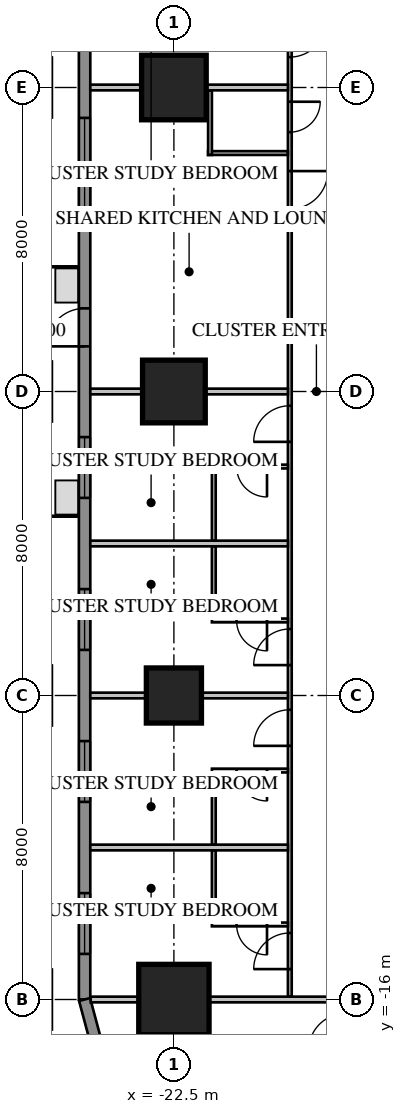
"""IFC4 building model, lengths in metres.
Left out: names, types, materials, properties, quantities, classifications, styles, units other than length and angle.
Written with IfcOpenShell. Run it as: python <this file> out.ifc"""

import sys

from ifc_helpers import new_model, si_unit, direction, frame, frame_2d, origin, origin_2d, place, context, subcontext, project, spatial, rectangle, extrude, element, fill, save


model = new_model("IFC4")
c1 = context("Model", 3, precision=1e-05, world=origin(), true_north=direction((0.0, 1.0)))
c2 = subcontext(c1, "Body", "Model", "MODEL_VIEW")
j1 = project(units=[si_unit("LENGTHUNIT", "METRE"), si_unit("PLANEANGLEUNIT", "RADIAN")], contexts=[c1])
p1 = place(None, origin())
s1 = spatial("IfcSite", under=j1, at=p1, CompositionType="ELEMENT")
p2 = place(p1, origin())
s2 = spatial("IfcBuilding", under=s1, at=p2, CompositionType="ELEMENT")
p3 = place(p2, frame((0.0, 0.0, 39.1)))
s3 = spatial("IfcBuildingStorey", under=s2, at=p3, CompositionType="ELEMENT", Elevation=39.1)
p4 = place(p3, frame((-22.5, 8.0, 0.0), z_axis=(0.0, 0.0, 1.0), x_axis=(1.0, 0.0, 0.0)))
e1 = element("IfcColumn", 1, at=p4, inside=s3, PredefinedType="COLUMN", context=c2, shape_type="SweptSolid", body=[
    extrude(rectangle(XDim=1.7, YDim=1.7, at=origin_2d()), origin(), (0.0, 0.0, 1.0), 3.85),
])
p5 = place(p3, frame((-22.5, 0.0, 0.0), z_axis=(0.0, 0.0, 1.0), x_axis=(1.0, 0.0, 0.0)))
e2 = element("IfcColumn", 2, at=p5, inside=s3, PredefinedType="COLUMN", context=c2, shape_type="SweptSolid", body=[
    extrude(rectangle(XDim=1.65, YDim=1.65, at=origin_2d()), origin(), (0.0, 0.0, 1.0), 3.85),
])
p6 = place(p3, frame((-22.5, -8.0, 0.0), z_axis=(0.0, 0.0, 1.0), x_axis=(1.0, 0.0, 0.0)))
e3 = element("IfcColumn", 3, at=p6, inside=s3, PredefinedType="COLUMN", context=c2, shape_type="SweptSolid", body=[
    extrude(rectangle(XDim=1.45, YDim=1.45, at=origin_2d()), origin(), (0.0, 0.0, 1.0), 3.85),
])
p7 = place(p3, frame((-22.5, -16.0, 0.0), z_axis=(0.0, 0.0, 1.0), x_axis=(1.0, 0.0, 0.0)))
e4 = element("IfcColumn", 4, at=p7, inside=s3, PredefinedType="COLUMN", context=c2, shape_type="SweptSolid", body=[
    extrude(rectangle(XDim=1.85, YDim=1.85, at=origin_2d()), origin(), (0.0, 0.0, 1.0), 3.85),
])
p8 = place(p3, frame((-24.85, 16.0, 0.0), z_axis=(0.0, 0.0, 1.0), x_axis=(0.0, -1.0, 0.0)))
e5 = element("IfcWall", 5, at=p8, inside=s3, PredefinedType="SOLIDWALL", context=c2, shape_type="SweptSolid", body=[
    extrude(rectangle(XDim=32.0, YDim=0.3, at=frame_2d((16.0, 0.0))), origin(), (0.0, 0.0, 1.0), 3.65),
])
p9 = place(p8, frame((1.2, 0.0, 0.75)))
e6 = element("IfcOpeningElement", 6, at=p9, cuts=e5, PredefinedType="OPENING", context=c2, shape_type="SweptSolid", body=[
    extrude(rectangle(XDim=1.6, YDim=1.8, at=frame_2d((0.8, 0.9))), frame((0.0, 0.17, 0.0), z_axis=(0.0, -1.0, 0.0), x_axis=(1.0, 0.0, 0.0)), (0.0, 0.0, 1.0), 0.34),
])
p10 = place(p8, frame((5.2, 0.0, 0.75)))
e7 = element("IfcOpeningElement", 7, at=p10, cuts=e5, PredefinedType="OPENING", context=c2, shape_type="SweptSolid", body=[
    extrude(rectangle(XDim=1.6, YDim=1.8, at=frame_2d((0.8, 0.9))), frame((0.0, 0.17, 0.0), z_axis=(0.0, -1.0, 0.0), x_axis=(1.0, 0.0, 0.0)), (0.0, 0.0, 1.0), 0.34),
])
p11 = place(p8, frame((17.2, 0.0, 0.75)))
e8 = element("IfcOpeningElement", 8, at=p11, cuts=e5, PredefinedType="OPENING", context=c2, shape_type="SweptSolid", body=[
    extrude(rectangle(XDim=1.6, YDim=1.8, at=frame_2d((0.8, 0.9))), frame((0.0, 0.17, 0.0), z_axis=(0.0, -1.0, 0.0), x_axis=(1.0, 0.0, 0.0)), (0.0, 0.0, 1.0), 0.34),
])
p12 = place(p8, frame((21.2, 0.0, 0.75)))
e9 = element("IfcOpeningElement", 9, at=p12, cuts=e5, PredefinedType="OPENING", context=c2, shape_type="SweptSolid", body=[
    extrude(rectangle(XDim=1.6, YDim=1.8, at=frame_2d((0.8, 0.9))), frame((0.0, 0.17, 0.0), z_axis=(0.0, -1.0, 0.0), x_axis=(1.0, 0.0, 0.0)), (0.0, 0.0, 1.0), 0.34),
])
p13 = place(p8, frame((25.2, 0.0, 0.75)))
e10 = element("IfcOpeningElement", 10, at=p13, cuts=e5, PredefinedType="OPENING", context=c2, shape_type="SweptSolid", body=[
    extrude(rectangle(XDim=1.6, YDim=1.8, at=frame_2d((0.8, 0.9))), frame((0.0, 0.17, 0.0), z_axis=(0.0, -1.0, 0.0), x_axis=(1.0, 0.0, 0.0)), (0.0, 0.0, 1.0), 0.34),
])
p14 = place(p8, frame((29.2, 0.0, 0.75)))
e11 = element("IfcOpeningElement", 11, at=p14, cuts=e5, PredefinedType="OPENING", context=c2, shape_type="SweptSolid", body=[
    extrude(rectangle(XDim=1.6, YDim=1.8, at=frame_2d((0.8, 0.9))), frame((0.0, 0.17, 0.0), z_axis=(0.0, -1.0, 0.0), x_axis=(1.0, 0.0, 0.0)), (0.0, 0.0, 1.0), 0.34),
])
p15 = place(p8, frame((8.8, 0.0, 0.75)))
e12 = element("IfcOpeningElement", 12, at=p15, cuts=e5, PredefinedType="OPENING", context=c2, shape_type="SweptSolid", body=[
    extrude(rectangle(XDim=2.4, YDim=1.8, at=frame_2d((1.2, 0.9))), frame((0.0, 0.17, 0.0), z_axis=(0.0, -1.0, 0.0), x_axis=(1.0, 0.0, 0.0)), (0.0, 0.0, 1.0), 0.34),
])
p16 = place(p8, frame((13.812, 0.0, 0.0)))
e13 = element("IfcOpeningElement", 13, at=p16, cuts=e5, PredefinedType="OPENING", context=c2, shape_type="SweptSolid", body=[
    extrude(rectangle(XDim=1.0, YDim=2.4, at=frame_2d((0.5, 1.2))), frame((0.0, 0.17, 0.0), z_axis=(0.0, -1.0, 0.0), x_axis=(1.0, 0.0, 0.0)), (0.0, 0.0, 1.0), 0.34),
])
p17 = place(p3, frame((-24.85, -16.0, 0.0), z_axis=(0.0, 0.0, 1.0), x_axis=(0.258839972501, -0.965920218567, 0.0)))
e14 = element("IfcWall", 14, at=p17, inside=s3, PredefinedType="SOLIDWALL", context=c2, shape_type="SweptSolid", body=[
    extrude(rectangle(XDim=4.581, YDim=0.3, at=frame_2d((2.291, 0.0))), origin(), (0.0, 0.0, 1.0), 3.65),
])
p18 = place(p3, frame((-19.45, 15.925, 0.0), z_axis=(0.0, 0.0, 1.0), x_axis=(0.0, -1.0, 0.0)))
e15 = element("IfcWall", 15, at=p18, inside=s3, PredefinedType="PARTITIONING", context=c2, shape_type="SweptSolid", body=[
    extrude(rectangle(XDim=31.85, YDim=0.1, at=frame_2d((15.925, 0.0))), origin(), (0.0, 0.0, 1.0), 3.65),
])
p19 = place(p18, frame((10.125, 0.0, 0.0)))
e16 = element("IfcOpeningElement", 16, at=p19, cuts=e15, PredefinedType="OPENING", context=c2, shape_type="SweptSolid", body=[
    extrude(rectangle(XDim=1.0, YDim=2.1, at=frame_2d((0.5, 1.05))), frame((0.0, 0.07, 0.0), z_axis=(0.0, -1.0, 0.0), x_axis=(1.0, 0.0, 0.0)), (0.0, 0.0, 1.0), 0.14),
])
p20 = place(p18, frame((8.3, 0.0, 0.0)))
e17 = element("IfcOpeningElement", 17, at=p20, cuts=e15, PredefinedType="OPENING", context=c2, shape_type="SweptSolid", body=[
    extrude(rectangle(XDim=0.8, YDim=2.1, at=frame_2d((0.4, 1.05))), frame((0.0, 0.07, 0.0), z_axis=(0.0, -1.0, 0.0), x_axis=(1.0, 0.0, 0.0)), (0.0, 0.0, 1.0), 0.14),
])
p21 = place(p18, frame((0.3, 0.0, 0.0)))
e18 = element("IfcOpeningElement", 18, at=p21, cuts=e15, PredefinedType="OPENING", context=c2, shape_type="SweptSolid", body=[
    extrude(rectangle(XDim=0.95, YDim=2.1, at=frame_2d((0.475, 1.05))), frame((0.0, 0.07, 0.0), z_axis=(0.0, -1.0, 0.0), x_axis=(1.0, 0.0, 0.0)), (0.0, 0.0, 1.0), 0.14),
])
p22 = place(p18, frame((6.175, 0.0, 0.0)))
e19 = element("IfcOpeningElement", 19, at=p22, cuts=e15, PredefinedType="OPENING", context=c2, shape_type="SweptSolid", body=[
    extrude(rectangle(XDim=0.95, YDim=2.1, at=frame_2d((0.475, 1.05))), frame((0.0, 0.07, 0.0), z_axis=(0.0, -1.0, 0.0), x_axis=(1.0, 0.0, 0.0)), (0.0, 0.0, 1.0), 0.14),
])
p23 = place(p18, frame((16.3, 0.0, 0.0)))
e20 = element("IfcOpeningElement", 20, at=p23, cuts=e15, PredefinedType="OPENING", context=c2, shape_type="SweptSolid", body=[
    extrude(rectangle(XDim=0.95, YDim=2.1, at=frame_2d((0.475, 1.05))), frame((0.0, 0.07, 0.0), z_axis=(0.0, -1.0, 0.0), x_axis=(1.0, 0.0, 0.0)), (0.0, 0.0, 1.0), 0.14),
])
p24 = place(p18, frame((22.175, 0.0, 0.0)))
e21 = element("IfcOpeningElement", 21, at=p24, cuts=e15, PredefinedType="OPENING", context=c2, shape_type="SweptSolid", body=[
    extrude(rectangle(XDim=0.95, YDim=2.1, at=frame_2d((0.475, 1.05))), frame((0.0, 0.07, 0.0), z_axis=(0.0, -1.0, 0.0), x_axis=(1.0, 0.0, 0.0)), (0.0, 0.0, 1.0), 0.14),
])
p25 = place(p18, frame((24.3, 0.0, 0.0)))
e22 = element("IfcOpeningElement", 22, at=p25, cuts=e15, PredefinedType="OPENING", context=c2, shape_type="SweptSolid", body=[
    extrude(rectangle(XDim=0.95, YDim=2.1, at=frame_2d((0.475, 1.05))), frame((0.0, 0.07, 0.0), z_axis=(0.0, -1.0, 0.0), x_axis=(1.0, 0.0, 0.0)), (0.0, 0.0, 1.0), 0.14),
])
p26 = place(p18, frame((30.175, 0.0, 0.0)))
e23 = element("IfcOpeningElement", 23, at=p26, cuts=e15, PredefinedType="OPENING", context=c2, shape_type="SweptSolid", body=[
    extrude(rectangle(XDim=0.95, YDim=2.1, at=frame_2d((0.475, 1.05))), frame((0.0, 0.07, 0.0), z_axis=(0.0, -1.0, 0.0), x_axis=(1.0, 0.0, 0.0)), (0.0, 0.0, 1.0), 0.14),
])
p27 = place(p3, frame((-19.5, 6.275, 0.0), z_axis=(0.0, 0.0, 1.0), x_axis=(-1.0, 0.0, 0.0)))
e24 = element("IfcWall", 24, at=p27, inside=s3, PredefinedType="PARTITIONING", context=c2, shape_type="SweptSolid", body=[
    extrude(rectangle(XDim=2.1, YDim=0.1, at=frame_2d((1.05, 0.0))), origin(), (0.0, 0.0, 1.0), 3.65),
])
p28 = place(p3, frame((-21.55, 7.925, 0.0), z_axis=(0.0, 0.0, 1.0), x_axis=(0.0, -1.0, 0.0)))
e25 = element("IfcWall", 25, at=p28, inside=s3, PredefinedType="PARTITIONING", context=c2, shape_type="SweptSolid", body=[
    extrude(rectangle(XDim=1.7, YDim=0.1, at=frame_2d((0.85, 0.0))), origin(), (0.0, 0.0, 1.0), 3.65),
])
p29 = place(p3, frame((-19.5, 8.0, 0.0), z_axis=(0.0, 0.0, 1.0), x_axis=(-1.0, 0.0, 0.0)))
e26 = element("IfcWall", 26, at=p29, inside=s3, PredefinedType="PARTITIONING", context=c2, shape_type="SweptSolid", body=[
    extrude(rectangle(XDim=5.2, YDim=0.15, at=frame_2d((2.6, 0.0))), origin(), (0.0, 0.0, 1.0), 3.65),
])
p30 = place(p3, frame((-19.5, 0.0, 0.0), z_axis=(0.0, 0.0, 1.0), x_axis=(-1.0, 0.0, 0.0)))
e27 = element("IfcWall", 27, at=p30, inside=s3, PredefinedType="PARTITIONING", context=c2, shape_type="SweptSolid", body=[
    extrude(rectangle(XDim=5.2, YDim=0.15, at=frame_2d((2.6, 0.0))), origin(), (0.0, 0.0, 1.0), 2.957),
])
for number, where, z_axis, x_axis in (
    (28, (-19.5, -4.0, 0.0), (0.0, 0.0, 1.0), (-1.0, 0.0, 0.0)),
    (29, (-19.5, -8.0, 0.0), (0.0, 0.0, 1.0), (-1.0, 0.0, 0.0)),
    (30, (-19.5, -12.0, 0.0), (0.0, 0.0, 1.0), (-1.0, 0.0, 0.0)),
):
    element("IfcWall", number, at=place(p3, frame(where, z_axis=z_axis, x_axis=x_axis)), inside=s3, PredefinedType="PARTITIONING", context=c2, shape_type="SweptSolid", body=[
        extrude(rectangle(XDim=5.2, YDim=0.15, at=frame_2d((2.6, 0.0))), origin(), (0.0, 0.0, 1.0), 3.65),
    ])
p31 = place(p3, frame((-18.1, -16.0, 0.0), z_axis=(0.0, 0.0, 1.0), x_axis=(-1.0, 0.0, 0.0)))
e31 = element("IfcWall", 31, at=p31, inside=s3, PredefinedType="PARTITIONING", context=c2, shape_type="SweptSolid", body=[
    extrude(rectangle(XDim=6.589, YDim=0.15, at=frame_2d((3.295, 0.0))), origin(), (0.0, 0.0, 1.0), 3.65),
])
p32 = place(p3, frame((-19.5, -1.975, 0.0), z_axis=(0.0, 0.0, 1.0), x_axis=(-1.0, 0.0, 0.0)))
e32 = element("IfcWall", 32, at=p32, inside=s3, PredefinedType="PARTITIONING", context=c2, shape_type="SweptSolid", body=[
    extrude(rectangle(XDim=2.0, YDim=0.1, at=frame_2d((1.0, 0.0))), origin(), (0.0, 0.0, 1.0), 3.65),
])
p33 = place(p32, frame((0.55, 0.0, 0.0)))
e33 = element("IfcOpeningElement", 33, at=p33, cuts=e32, PredefinedType="OPENING", context=c2, shape_type="SweptSolid", body=[
    extrude(rectangle(XDim=0.8, YDim=2.1, at=frame_2d((0.4, 1.05))), frame((0.0, 0.07, 0.0), z_axis=(0.0, -1.0, 0.0), x_axis=(1.0, 0.0, 0.0)), (0.0, 0.0, 1.0), 0.14),
])
p34 = place(p3, frame((-21.45, -2.025, 0.0), z_axis=(0.0, 0.0, 1.0), x_axis=(0.0, -1.0, 0.0)))
e34 = element("IfcWall", 34, at=p34, inside=s3, PredefinedType="PARTITIONING", context=c2, shape_type="SweptSolid", body=[
    extrude(rectangle(XDim=1.9, YDim=0.1, at=frame_2d((0.95, 0.0))), origin(), (0.0, 0.0, 1.0), 3.65),
])
p35 = place(p3, frame((-19.5, -6.025, 0.0), z_axis=(0.0, 0.0, 1.0), x_axis=(-1.0, 0.0, 0.0)))
e35 = element("IfcWall", 35, at=p35, inside=s3, PredefinedType="PARTITIONING", context=c2, shape_type="SweptSolid", body=[
    extrude(rectangle(XDim=2.0, YDim=0.1, at=frame_2d((1.0, 0.0))), origin(), (0.0, 0.0, 1.0), 3.65),
])
p36 = place(p35, frame((0.55, 0.0, 0.0)))
e36 = element("IfcOpeningElement", 36, at=p36, cuts=e35, PredefinedType="OPENING", context=c2, shape_type="SweptSolid", body=[
    extrude(rectangle(XDim=0.8, YDim=2.1, at=frame_2d((0.4, 1.05))), frame((0.0, 0.07, 0.0), z_axis=(0.0, -1.0, 0.0), x_axis=(1.0, 0.0, 0.0)), (0.0, 0.0, 1.0), 0.14),
])
p37 = place(p3, frame((-21.45, -4.075, 0.0), z_axis=(0.0, 0.0, 1.0), x_axis=(0.0, -1.0, 0.0)))
e37 = element("IfcWall", 37, at=p37, inside=s3, PredefinedType="PARTITIONING", context=c2, shape_type="SweptSolid", body=[
    extrude(rectangle(XDim=1.9, YDim=0.1, at=frame_2d((0.95, 0.0))), origin(), (0.0, 0.0, 1.0), 3.65),
])
p38 = place(p3, frame((-19.5, -9.975, 0.0), z_axis=(0.0, 0.0, 1.0), x_axis=(-1.0, 0.0, 0.0)))
e38 = element("IfcWall", 38, at=p38, inside=s3, PredefinedType="PARTITIONING", context=c2, shape_type="SweptSolid", body=[
    extrude(rectangle(XDim=2.0, YDim=0.1, at=frame_2d((1.0, 0.0))), origin(), (0.0, 0.0, 1.0), 3.65),
])
p39 = place(p38, frame((0.55, 0.0, 0.0)))
e39 = element("IfcOpeningElement", 39, at=p39, cuts=e38, PredefinedType="OPENING", context=c2, shape_type="SweptSolid", body=[
    extrude(rectangle(XDim=0.8, YDim=2.1, at=frame_2d((0.4, 1.05))), frame((0.0, 0.07, 0.0), z_axis=(0.0, -1.0, 0.0), x_axis=(1.0, 0.0, 0.0)), (0.0, 0.0, 1.0), 0.14),
])
p40 = place(p3, frame((-21.45, -10.025, 0.0), z_axis=(0.0, 0.0, 1.0), x_axis=(0.0, -1.0, 0.0)))
e40 = element("IfcWall", 40, at=p40, inside=s3, PredefinedType="PARTITIONING", context=c2, shape_type="SweptSolid", body=[
    extrude(rectangle(XDim=1.9, YDim=0.1, at=frame_2d((0.95, 0.0))), origin(), (0.0, 0.0, 1.0), 3.65),
])
p41 = place(p3, frame((-19.5, -14.025, 0.0), z_axis=(0.0, 0.0, 1.0), x_axis=(-1.0, 0.0, 0.0)))
e41 = element("IfcWall", 41, at=p41, inside=s3, PredefinedType="PARTITIONING", context=c2, shape_type="SweptSolid", body=[
    extrude(rectangle(XDim=2.0, YDim=0.1, at=frame_2d((1.0, 0.0))), origin(), (0.0, 0.0, 1.0), 3.65),
])
p42 = place(p41, frame((0.55, 0.0, 0.0)))
e42 = element("IfcOpeningElement", 42, at=p42, cuts=e41, PredefinedType="OPENING", context=c2, shape_type="SweptSolid", body=[
    extrude(rectangle(XDim=0.8, YDim=2.1, at=frame_2d((0.4, 1.05))), frame((0.0, 0.07, 0.0), z_axis=(0.0, -1.0, 0.0), x_axis=(1.0, 0.0, 0.0)), (0.0, 0.0, 1.0), 0.14),
])
p43 = place(p3, frame((-21.45, -12.075, 0.0), z_axis=(0.0, 0.0, 1.0), x_axis=(0.0, -1.0, 0.0)))
e43 = element("IfcWall", 43, at=p43, inside=s3, PredefinedType="PARTITIONING", context=c2, shape_type="SweptSolid", body=[
    extrude(rectangle(XDim=1.9, YDim=0.1, at=frame_2d((0.95, 0.0))), origin(), (0.0, 0.0, 1.0), 3.65),
])
p44 = place(p11, origin())
e44 = element("IfcWindow", 44, at=p44, inside=s3, PartitioningType="SINGLE_PANEL", PredefinedType="WINDOW", context=c2, shape_type="SweptSolid", body=[
    extrude(rectangle(XDim=1.6, YDim=1.8, at=frame_2d((0.8, 0.9))), frame((0.0, 0.03, 0.0), z_axis=(0.0, -1.0, 0.0), x_axis=(1.0, 0.0, 0.0)), (0.0, 0.0, 1.0), 0.06),
])
fill(e8, e44)
p45 = place(p12, origin())
e45 = element("IfcWindow", 45, at=p45, inside=s3, PartitioningType="SINGLE_PANEL", PredefinedType="WINDOW", context=c2, shape_type="SweptSolid", body=[
    extrude(rectangle(XDim=1.6, YDim=1.8, at=frame_2d((0.8, 0.9))), frame((0.0, 0.03, 0.0), z_axis=(0.0, -1.0, 0.0), x_axis=(1.0, 0.0, 0.0)), (0.0, 0.0, 1.0), 0.06),
])
fill(e9, e45)
p46 = place(p13, origin())
e46 = element("IfcWindow", 46, at=p46, inside=s3, PartitioningType="SINGLE_PANEL", PredefinedType="WINDOW", context=c2, shape_type="SweptSolid", body=[
    extrude(rectangle(XDim=1.6, YDim=1.8, at=frame_2d((0.8, 0.9))), frame((0.0, 0.03, 0.0), z_axis=(0.0, -1.0, 0.0), x_axis=(1.0, 0.0, 0.0)), (0.0, 0.0, 1.0), 0.06),
])
fill(e10, e46)
p47 = place(p14, origin())
e47 = element("IfcWindow", 47, at=p47, inside=s3, PartitioningType="SINGLE_PANEL", PredefinedType="WINDOW", context=c2, shape_type="SweptSolid", body=[
    extrude(rectangle(XDim=1.6, YDim=1.8, at=frame_2d((0.8, 0.9))), frame((0.0, 0.03, 0.0), z_axis=(0.0, -1.0, 0.0), x_axis=(1.0, 0.0, 0.0)), (0.0, 0.0, 1.0), 0.06),
])
fill(e11, e47)
p48 = place(p15, origin())
e48 = element("IfcWindow", 48, at=p48, inside=s3, PartitioningType="SINGLE_PANEL", PredefinedType="WINDOW", context=c2, shape_type="SweptSolid", body=[
    extrude(rectangle(XDim=2.4, YDim=1.8, at=frame_2d((1.2, 0.9))), frame((0.0, 0.03, 0.0), z_axis=(0.0, -1.0, 0.0), x_axis=(1.0, 0.0, 0.0)), (0.0, 0.0, 1.0), 0.06),
])
fill(e12, e48)
p49 = place(p16, origin())
e49 = element("IfcDoor", 49, at=p49, inside=s3, OperationType="SINGLE_SWING_RIGHT", PredefinedType="DOOR", context=c2, shape_type="SweptSolid", body=[
    extrude(rectangle(XDim=1.0, YDim=2.4, at=frame_2d((0.5, 1.2))), frame((0.0, 0.025, 0.0), z_axis=(0.0, -1.0, 0.0), x_axis=(1.0, 0.0, 0.0)), (0.0, 0.0, 1.0), 0.05),
])
fill(e13, e49)
p50 = place(p19, origin())
e50 = element("IfcDoor", 50, at=p50, inside=s3, OperationType="SINGLE_SWING_LEFT", PredefinedType="DOOR", context=c2, shape_type="SweptSolid", body=[
    extrude(rectangle(XDim=1.0, YDim=2.1, at=frame_2d((0.5, 1.05))), frame((0.0, 0.025, 0.0), z_axis=(0.0, -1.0, 0.0), x_axis=(1.0, 0.0, 0.0)), (0.0, 0.0, 1.0), 0.05),
])
fill(e16, e50)
p51 = place(p20, origin())
e51 = element("IfcDoor", 51, at=p51, inside=s3, OperationType="SINGLE_SWING_LEFT", PredefinedType="DOOR", context=c2, shape_type="SweptSolid", body=[
    extrude(rectangle(XDim=0.8, YDim=2.1, at=frame_2d((0.4, 1.05))), frame((0.0, 0.025, 0.0), z_axis=(0.0, -1.0, 0.0), x_axis=(1.0, 0.0, 0.0)), (0.0, 0.0, 1.0), 0.05),
])
fill(e17, e51)
p52 = place(p22, origin())
e52 = element("IfcDoor", 52, at=p52, inside=s3, OperationType="SINGLE_SWING_LEFT", PredefinedType="DOOR", context=c2, shape_type="SweptSolid", body=[
    extrude(rectangle(XDim=0.95, YDim=2.1, at=frame_2d((0.475, 1.05))), frame((0.0, 0.025, 0.0), z_axis=(0.0, -1.0, 0.0), x_axis=(1.0, 0.0, 0.0)), (0.0, 0.0, 1.0), 0.05),
])
fill(e19, e52)
p53 = place(p23, origin())
e53 = element("IfcDoor", 53, at=p53, inside=s3, OperationType="SINGLE_SWING_RIGHT", PredefinedType="DOOR", context=c2, shape_type="SweptSolid", body=[
    extrude(rectangle(XDim=0.95, YDim=2.1, at=frame_2d((0.475, 1.05))), frame((0.0, 0.025, 0.0), z_axis=(0.0, -1.0, 0.0), x_axis=(1.0, 0.0, 0.0)), (0.0, 0.0, 1.0), 0.05),
])
fill(e20, e53)
p54 = place(p33, origin())
e54 = element("IfcDoor", 54, at=p54, inside=s3, OperationType="SINGLE_SWING_LEFT", PredefinedType="DOOR", context=c2, shape_type="SweptSolid", body=[
    extrude(rectangle(XDim=0.8, YDim=2.1, at=frame_2d((0.4, 1.05))), frame((0.0, 0.025, 0.0), z_axis=(0.0, -1.0, 0.0), x_axis=(1.0, 0.0, 0.0)), (0.0, 0.0, 1.0), 0.05),
])
fill(e33, e54)
p55 = place(p24, origin())
e55 = element("IfcDoor", 55, at=p55, inside=s3, OperationType="SINGLE_SWING_RIGHT", PredefinedType="DOOR", context=c2, shape_type="SweptSolid", body=[
    extrude(rectangle(XDim=0.95, YDim=2.1, at=frame_2d((0.475, 1.05))), frame((0.0, 0.025, 0.0), z_axis=(0.0, -1.0, 0.0), x_axis=(1.0, 0.0, 0.0)), (0.0, 0.0, 1.0), 0.05),
])
fill(e21, e55)
p56 = place(p36, origin())
e56 = element("IfcDoor", 56, at=p56, inside=s3, OperationType="SINGLE_SWING_LEFT", PredefinedType="DOOR", context=c2, shape_type="SweptSolid", body=[
    extrude(rectangle(XDim=0.8, YDim=2.1, at=frame_2d((0.4, 1.05))), frame((0.0, 0.025, 0.0), z_axis=(0.0, -1.0, 0.0), x_axis=(1.0, 0.0, 0.0)), (0.0, 0.0, 1.0), 0.05),
])
fill(e36, e56)
p57 = place(p25, origin())
e57 = element("IfcDoor", 57, at=p57, inside=s3, OperationType="SINGLE_SWING_RIGHT", PredefinedType="DOOR", context=c2, shape_type="SweptSolid", body=[
    extrude(rectangle(XDim=0.95, YDim=2.1, at=frame_2d((0.475, 1.05))), frame((0.0, 0.025, 0.0), z_axis=(0.0, -1.0, 0.0), x_axis=(1.0, 0.0, 0.0)), (0.0, 0.0, 1.0), 0.05),
])
fill(e22, e57)
p58 = place(p39, origin())
e58 = element("IfcDoor", 58, at=p58, inside=s3, OperationType="SINGLE_SWING_LEFT", PredefinedType="DOOR", context=c2, shape_type="SweptSolid", body=[
    extrude(rectangle(XDim=0.8, YDim=2.1, at=frame_2d((0.4, 1.05))), frame((0.0, 0.025, 0.0), z_axis=(0.0, -1.0, 0.0), x_axis=(1.0, 0.0, 0.0)), (0.0, 0.0, 1.0), 0.05),
])
fill(e39, e58)
p59 = place(p26, origin())
e59 = element("IfcDoor", 59, at=p59, inside=s3, OperationType="SINGLE_SWING_RIGHT", PredefinedType="DOOR", context=c2, shape_type="SweptSolid", body=[
    extrude(rectangle(XDim=0.95, YDim=2.1, at=frame_2d((0.475, 1.05))), frame((0.0, 0.025, 0.0), z_axis=(0.0, -1.0, 0.0), x_axis=(1.0, 0.0, 0.0)), (0.0, 0.0, 1.0), 0.05),
])
fill(e23, e59)
p60 = place(p42, origin())
e60 = element("IfcDoor", 60, at=p60, inside=s3, OperationType="SINGLE_SWING_LEFT", PredefinedType="DOOR", context=c2, shape_type="SweptSolid", body=[
    extrude(rectangle(XDim=0.8, YDim=2.1, at=frame_2d((0.4, 1.05))), frame((0.0, 0.025, 0.0), z_axis=(0.0, -1.0, 0.0), x_axis=(1.0, 0.0, 0.0)), (0.0, 0.0, 1.0), 0.05),
])
fill(e42, e60)
save(model, sys.argv[1])
